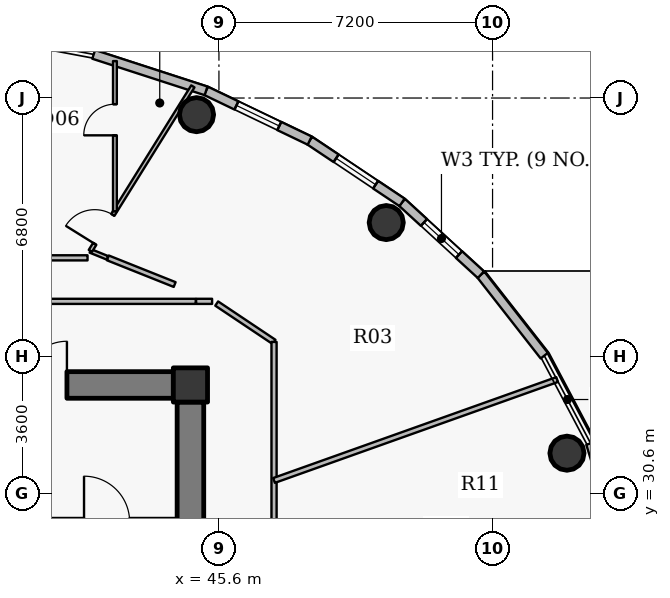
"""IFC4 building model, lengths in metres.
Left out: names, types, materials, properties, quantities, classifications, styles, units other than length and angle.
Written with IfcOpenShell. Run it as: python <this file> out.ifc"""

import sys

from ifc_helpers import new_model, si_unit, direction, frame, frame_2d, origin, origin_2d, place, context, subcontext, project, spatial, rectangle, hollow_circle, extrude, source, transform, mapped, element, fill, save


model = new_model("IFC4")
c1 = context("Model", 3, precision=1e-05, world=origin(), true_north=direction((0.0, 1.0)))
c2 = subcontext(c1, "Body", "Model", "MODEL_VIEW")
j1 = project(units=[si_unit("LENGTHUNIT", "METRE"), si_unit("PLANEANGLEUNIT", "RADIAN")], contexts=[c1])
p1 = place(None, origin())
s1 = spatial("IfcSite", under=j1, at=p1, CompositionType="ELEMENT")
p2 = place(p1, origin())
s2 = spatial("IfcBuilding", under=s1, at=p2, CompositionType="ELEMENT")
p3 = place(p2, frame((0.0, 0.0, 355.2)))
s3 = spatial("IfcBuildingStorey", under=s2, at=p3, CompositionType="ELEMENT", Elevation=355.2)
p4 = place(p3, frame((44.85, 33.45, 0.0), z_axis=(0.0, 0.0, 1.0), x_axis=(1.0, 0.0, 0.0)))
e1 = element("IfcColumn", 1, at=p4, inside=s3, PredefinedType="COLUMN", context=c2, shape_type="SweptSolid", body=[
    extrude(rectangle(XDim=0.9, YDim=0.9, at=origin_2d()), origin(), (0.0, 0.0, 1.0), 4.2),
])
p5 = place(p3, frame((27.6, 33.45, 0.0), z_axis=(0.0, 0.0, 1.0), x_axis=(1.0, 0.0, 0.0)))
e2 = element("IfcWall", 2, at=p5, inside=s3, PredefinedType="SHEAR", context=c2, shape_type="SweptSolid", body=[
    extrude(rectangle(XDim=16.8, YDim=0.7, at=frame_2d((8.4, 0.0))), origin(), (0.0, 0.0, 1.0), 3.5),
])
p6 = place(p5, frame((12.85, 0.0, 0.0)))
e3 = element("IfcOpeningElement", 3, at=p6, cuts=e2, PredefinedType="OPENING", context=c2, shape_type="SweptSolid", body=[
    extrude(rectangle(XDim=1.15, YDim=2.15, at=origin_2d()), frame((0.575, 0.36, 1.075), z_axis=(0.0, -1.0, 0.0), x_axis=(1.0, 0.0, 0.0)), (0.0, 0.0, 1.0), 0.72),
])
p7 = place(p3, frame((44.85, 33.0, 0.0), z_axis=(0.0, 0.0, 1.0), x_axis=(0.0, -1.0, 0.0)))
e4 = element("IfcWall", 4, at=p7, inside=s3, PredefinedType="SHEAR", context=c2, shape_type="SweptSolid", body=[
    extrude(rectangle(XDim=12.0, YDim=0.7, at=frame_2d((6.0, 0.0))), origin(), (0.0, 0.0, 1.0), 3.5),
])
for number, where, z_axis, x_axis in (
    (5, (54.758, 31.655, 0.0), (0.0, 0.0, 1.0), (1.0, 0.0, 0.0)),
    (6, (50.002, 37.723, 0.0), (0.0, 0.0, 1.0), (1.0, 0.0, 0.0)),
    (7, (45.01, 40.562, 0.0), (0.0, 0.0, 1.0), (1.0, 0.0, 0.0)),
):
    element("IfcColumn", number, at=place(p3, frame(where, z_axis=z_axis, x_axis=x_axis)), inside=s3, PredefinedType="COLUMN", context=c2, shape_type="SweptSolid", body=[
        extrude(hollow_circle(Radius=0.45, WallThickness=0.028, at=origin_2d()), origin(), (0.0, 0.0, 1.0), 4.2),
    ])
p8 = place(p3, frame((55.381, 31.913, 0.0), z_axis=(0.0, 0.0, 1.0), x_axis=(0.293105547213, -0.956080089842, 0.0)))
e8 = element("IfcWall", 8, at=p8, inside=s3, PredefinedType="SOLIDWALL", context=c2, shape_type="SweptSolid", body=[
    extrude(rectangle(XDim=2.538, YDim=0.24, at=frame_2d((1.269, 0.0))), origin(), (0.0, 0.0, 1.0), 3.95),
])
p9 = place(p3, frame((52.493, 36.352, 0.0), z_axis=(0.0, 0.0, 1.0), x_axis=(0.616286367698, -0.78752213492, 0.0)))
e9 = element("IfcWall", 9, at=p9, inside=s3, PredefinedType="SOLIDWALL", context=c2, shape_type="SweptSolid", body=[
    extrude(rectangle(XDim=2.706, YDim=0.24, at=frame_2d((1.353, 0.0))), origin(), (0.0, 0.0, 1.0), 3.95),
])
p10 = place(p3, frame((50.419, 38.254, 0.0), z_axis=(0.0, 0.0, 1.0), x_axis=(0.737020907932, -0.675869944051, 0.0)))
e10 = element("IfcWall", 10, at=p10, inside=s3, PredefinedType="SOLIDWALL", context=c2, shape_type="SweptSolid", body=[
    extrude(rectangle(XDim=2.815, YDim=0.24, at=frame_2d((1.407, 0.0))), origin(), (0.0, 0.0, 1.0), 3.95),
])
p11 = place(p10, frame((0.782, 0.0, 0.9)))
e11 = element("IfcOpeningElement", 11, at=p11, cuts=e10, PredefinedType="OPENING", context=c2, shape_type="SweptSolid", body=[
    extrude(rectangle(XDim=1.25, YDim=1.65, at=origin_2d()), frame((0.625, 0.13, 0.825), z_axis=(0.0, -1.0, 0.0), x_axis=(1.0, 0.0, 0.0)), (0.0, 0.0, 1.0), 0.26),
])
p12 = place(p3, frame((47.988, 39.88, 0.0), z_axis=(0.0, 0.0, 1.0), x_axis=(0.831201688654, -0.555970999944, 0.0)))
e12 = element("IfcWall", 12, at=p12, inside=s3, PredefinedType="SOLIDWALL", context=c2, shape_type="SweptSolid", body=[
    extrude(rectangle(XDim=2.925, YDim=0.24, at=frame_2d((1.462, 0.0))), origin(), (0.0, 0.0, 1.0), 3.95),
])
p13 = place(p12, frame((0.837, 0.0, 0.9)))
e13 = element("IfcOpeningElement", 13, at=p13, cuts=e12, PredefinedType="OPENING", context=c2, shape_type="SweptSolid", body=[
    extrude(rectangle(XDim=1.25, YDim=1.65, at=origin_2d()), frame((0.625, 0.13, 0.825), z_axis=(0.0, -1.0, 0.0), x_axis=(1.0, 0.0, 0.0)), (0.0, 0.0, 1.0), 0.26),
])
p14 = place(p3, frame((45.26, 41.189, 0.0), z_axis=(0.0, 0.0, 1.0), x_axis=(0.901557057889, -0.432660226241, 0.0)))
e14 = element("IfcWall", 14, at=p14, inside=s3, PredefinedType="SOLIDWALL", context=c2, shape_type="SweptSolid", body=[
    extrude(rectangle(XDim=3.025, YDim=0.24, at=frame_2d((1.513, 0.0))), origin(), (0.0, 0.0, 1.0), 3.95),
])
p15 = place(p14, frame((0.887, 0.0, 0.9)))
e15 = element("IfcOpeningElement", 15, at=p15, cuts=e14, PredefinedType="OPENING", context=c2, shape_type="SweptSolid", body=[
    extrude(rectangle(XDim=1.25, YDim=1.65, at=origin_2d()), frame((0.625, 0.13, 0.825), z_axis=(0.0, -1.0, 0.0), x_axis=(1.0, 0.0, 0.0)), (0.0, 0.0, 1.0), 0.26),
])
p16 = place(p3, frame((42.304, 42.148, 0.0), z_axis=(0.0, 0.0, 1.0), x_axis=(0.951212850731, -0.308535431682, 0.0)))
e16 = element("IfcWall", 16, at=p16, inside=s3, PredefinedType="SOLIDWALL", context=c2, shape_type="SweptSolid", body=[
    extrude(rectangle(XDim=3.108, YDim=0.24, at=frame_2d((1.554, 0.0))), origin(), (0.0, 0.0, 1.0), 3.95),
])
p17 = place(p3, frame((35.95, 29.85, 0.0), z_axis=(0.0, 0.0, 1.0), x_axis=(1.0, 0.0, 0.0)))
e17 = element("IfcWall", 17, at=p17, inside=s3, PredefinedType="PARTITIONING", context=c2, shape_type="SweptSolid", body=[
    extrude(rectangle(XDim=8.49, YDim=0.2, at=frame_2d((4.245, 0.0))), origin(), (0.0, 0.0, 1.0), 3.535),
])
p18 = place(p17, frame((6.1, 0.0, 0.0)))
e18 = element("IfcOpeningElement", 18, at=p18, cuts=e17, PredefinedType="OPENING", context=c2, shape_type="SweptSolid", body=[
    extrude(rectangle(XDim=1.2, YDim=2.15, at=origin_2d()), frame((0.6, 0.11, 1.075), z_axis=(0.0, -1.0, 0.0), x_axis=(1.0, 0.0, 0.0)), (0.0, 0.0, 1.0), 0.22),
])
p19 = place(p17, frame((0.37, 0.0, 0.0)))
e19 = element("IfcOpeningElement", 19, at=p19, cuts=e17, PredefinedType="OPENING", context=c2, shape_type="SweptSolid", body=[
    extrude(rectangle(XDim=1.15, YDim=2.15, at=origin_2d()), frame((0.575, 0.11, 1.075), z_axis=(0.0, -1.0, 0.0), x_axis=(1.0, 0.0, 0.0)), (0.0, 0.0, 1.0), 0.22),
])
p20 = place(p17, frame((2.425, 0.0, 0.0)))
e20 = element("IfcOpeningElement", 20, at=p20, cuts=e17, PredefinedType="OPENING", context=c2, shape_type="SweptSolid", body=[
    extrude(rectangle(XDim=1.05, YDim=2.15, at=origin_2d()), frame((0.525, 0.11, 1.075), z_axis=(0.0, -1.0, 0.0), x_axis=(1.0, 0.0, 0.0)), (0.0, 0.0, 1.0), 0.22),
])
p21 = place(p3, frame((42.216, 36.977, 0.0), z_axis=(0.0, 0.0, 1.0), x_axis=(0.926767657822, -0.375635073463, 0.0)))
e21 = element("IfcWall", 21, at=p21, inside=s3, PredefinedType="PARTITIONING", context=c2, shape_type="SweptSolid", body=[
    extrude(rectangle(XDim=0.486, YDim=0.1, at=frame_2d((0.243, 0.0))), origin(), (0.0, 0.0, 1.0), 3.485),
])
p22 = place(p3, frame((42.216, 36.977, 0.0), z_axis=(0.0, 0.0, 1.0), x_axis=(0.528823937776, 0.848731549334, 0.0)))
e22 = element("IfcWall", 22, at=p22, inside=s3, PredefinedType="PARTITIONING", context=c2, shape_type="SweptSolid", body=[
    extrude(rectangle(XDim=5.101, YDim=0.1, at=frame_2d((2.551, 0.0))), origin(), (0.0, 0.0, 1.0), 3.435),
])
p23 = place(p22, frame((0.218, 0.0, 0.0)))
e23 = element("IfcOpeningElement", 23, at=p23, cuts=e22, PredefinedType="OPENING", context=c2, shape_type="SweptSolid", body=[
    extrude(rectangle(XDim=0.9, YDim=2.1, at=origin_2d()), frame((0.45, 0.06, 1.05), z_axis=(0.0, -1.0, 0.0), x_axis=(1.0, 0.0, 0.0)), (0.0, 0.0, 1.0), 0.12),
])
p24 = place(p3, frame((42.863, 38.015, 0.0), z_axis=(0.0, 0.0, 1.0), x_axis=(0.0, 1.0, 0.0)))
e24 = element("IfcWall", 24, at=p24, inside=s3, PredefinedType="PARTITIONING", context=c2, shape_type="SweptSolid", body=[
    extrude(rectangle(XDim=3.957, YDim=0.1, at=frame_2d((1.979, 0.0))), origin(), (0.0, 0.0, 1.0), 3.435),
])
p25 = place(p24, frame((2.003, 0.0, 0.0)))
e25 = element("IfcOpeningElement", 25, at=p25, cuts=e24, PredefinedType="OPENING", context=c2, shape_type="SweptSolid", body=[
    extrude(rectangle(XDim=0.82, YDim=2.1, at=origin_2d()), frame((0.41, 0.06, 1.05), z_axis=(0.0, -1.0, 0.0), x_axis=(1.0, 0.0, 0.0)), (0.0, 0.0, 1.0), 0.12),
])
p26 = place(p3, frame((44.999, 35.65, 0.0), z_axis=(0.0, 0.0, 1.0), x_axis=(1.0, 0.0, 0.0)))
e26 = element("IfcWall", 26, at=p26, inside=s3, PredefinedType="PARTITIONING", context=c2, shape_type="SweptSolid", body=[
    extrude(rectangle(XDim=0.421, YDim=0.135, at=frame_2d((0.21, 0.0))), origin(), (0.0, 0.0, 1.0), 3.95),
])
p27 = place(p3, frame((45.541, 35.592, 0.0), z_axis=(0.0, 0.0, 1.0), x_axis=(0.831180227396, -0.556003084151, 0.0)))
e27 = element("IfcWall", 27, at=p27, inside=s3, PredefinedType="PARTITIONING", context=c2, shape_type="SweptSolid", body=[
    extrude(rectangle(XDim=1.815, YDim=0.135, at=frame_2d((0.908, 0.0))), origin(), (0.0, 0.0, 1.0), 3.485),
])
p28 = place(p3, frame((47.05, 19.417, 0.0), z_axis=(0.0, 0.0, 1.0), x_axis=(0.0, 1.0, 0.0)))
e28 = element("IfcWall", 28, at=p28, inside=s3, PredefinedType="PARTITIONING", context=c2, shape_type="SweptSolid", body=[
    extrude(rectangle(XDim=15.165, YDim=0.135, at=frame_2d((7.583, 0.0))), origin(), (0.0, 0.0, 1.0), 3.485),
])
p29 = place(p3, frame((47.05, 30.938, 0.0), z_axis=(0.0, 0.0, 1.0), x_axis=(0.94198404568, 0.335657649524, 0.0)))
e29 = element("IfcWall", 29, at=p29, inside=s3, PredefinedType="PARTITIONING", context=c2, shape_type="SweptSolid", body=[
    extrude(rectangle(XDim=7.908, YDim=0.135, at=frame_2d((3.954, 0.0))), origin(), (0.0, 0.0, 1.0), 3.435),
])
p30 = place(p3, frame((37.258, 35.65, 0.0), z_axis=(0.0, 0.0, 1.0), x_axis=(1.0, 0.0, 0.0)))
e30 = element("IfcWall", 30, at=p30, inside=s3, PredefinedType="PARTITIONING", context=c2, shape_type="SweptSolid", body=[
    extrude(rectangle(XDim=7.732, YDim=0.135, at=frame_2d((3.866, 0.0))), origin(), (0.0, 0.0, 1.0), 3.485),
])
p31 = place(p3, frame((45.2, 33.8, 0.0), z_axis=(0.0, 0.0, 1.0), x_axis=(-1.0, 0.0, 0.0)))
e31 = element("IfcWall", 31, at=p31, inside=s3, PredefinedType="PARTITIONING", context=c2, shape_type="SweptSolid", body=[
    extrude(rectangle(XDim=0.79, YDim=0.135, at=frame_2d((0.395, 0.0))), origin(), (0.0, 0.0, 1.0), 3.485),
])
p32 = place(p3, frame((45.2, 33.01, 0.0), z_axis=(0.0, 0.0, 1.0), x_axis=(0.0, 1.0, 0.0)))
e32 = element("IfcWall", 32, at=p32, inside=s3, PredefinedType="PARTITIONING", context=c2, shape_type="SweptSolid", body=[
    extrude(rectangle(XDim=0.482, YDim=0.135, at=frame_2d((0.241, 0.0))), origin(), (0.0, 0.0, 1.0), 3.95),
])
p33 = place(p3, frame((42.142, 36.795, 0.0), z_axis=(0.0, 0.0, 1.0), x_axis=(-1.0, 0.0, 0.0)))
e33 = element("IfcWall", 33, at=p33, inside=s3, PredefinedType="PARTITIONING", context=c2, shape_type="SweptSolid", body=[
    extrude(rectangle(XDim=4.865, YDim=0.135, at=frame_2d((2.432, 0.0))), origin(), (0.0, 0.0, 1.0), 3.95),
])
p34 = place(p3, frame((44.435, 36.092, 0.0), z_axis=(0.0, 0.0, 1.0), x_axis=(-0.928778774969, 0.370634573627, 0.0)))
e34 = element("IfcWall", 34, at=p34, inside=s3, PredefinedType="PARTITIONING", context=c2, shape_type="SweptSolid", body=[
    extrude(rectangle(XDim=1.893, YDim=0.135, at=frame_2d((0.947, 0.0))), origin(), (0.0, 0.0, 1.0), 3.485),
])
m1 = source(origin(), c2, "Body", "SweptSolid", [
    extrude(rectangle(XDim=1.25, YDim=1.65, at=origin_2d()), frame((0.625, 0.03, 0.825), z_axis=(0.0, -1.0, 0.0), x_axis=(1.0, 0.0, 0.0)), (0.0, 0.0, 1.0), 0.06),
])
p35 = place(p11, origin())
e35 = element("IfcWindow", 35, at=p35, inside=s3, PartitioningType="SINGLE_PANEL", PredefinedType="WINDOW", context=c2, shape_type="MappedRepresentation", body=[
    mapped(m1, transform((0.0, 0.0, 0.0), x_axis=(1.0, 0.0, 0.0), y_axis=(0.0, 1.0, 0.0), z_axis=(0.0, 0.0, 1.0), scale=1.0)),
])
fill(e11, e35)
p36 = place(p13, origin())
e36 = element("IfcWindow", 36, at=p36, inside=s3, PartitioningType="SINGLE_PANEL", PredefinedType="WINDOW", context=c2, shape_type="MappedRepresentation", body=[
    mapped(m1, transform((0.0, 0.0, 0.0), x_axis=(1.0, 0.0, 0.0), y_axis=(0.0, 1.0, 0.0), z_axis=(0.0, 0.0, 1.0), scale=1.0)),
])
fill(e13, e36)
p37 = place(p15, origin())
e37 = element("IfcWindow", 37, at=p37, inside=s3, PartitioningType="SINGLE_PANEL", PredefinedType="WINDOW", context=c2, shape_type="MappedRepresentation", body=[
    mapped(m1, transform((0.0, 0.0, 0.0), x_axis=(1.0, 0.0, 0.0), y_axis=(0.0, 1.0, 0.0), z_axis=(0.0, 0.0, 1.0), scale=1.0)),
])
fill(e15, e37)
m2 = source(origin(), c2, "Body", "SweptSolid", [
    extrude(rectangle(XDim=1.15, YDim=2.15, at=origin_2d()), frame((0.575, 0.025, 1.075), z_axis=(0.0, -1.0, 0.0), x_axis=(1.0, 0.0, 0.0)), (0.0, 0.0, 1.0), 0.05),
])
p38 = place(p6, origin())
e38 = element("IfcDoor", 38, at=p38, inside=s3, OperationType="SINGLE_SWING_RIGHT", PredefinedType="DOOR", context=c2, shape_type="MappedRepresentation", body=[
    mapped(m2, transform((0.0, 0.0, 0.0), x_axis=(1.0, 0.0, 0.0), y_axis=(0.0, 1.0, 0.0), z_axis=(0.0, 0.0, 1.0), scale=1.0)),
])
fill(e3, e38)
m3 = source(origin(), c2, "Body", "SweptSolid", [
    extrude(rectangle(XDim=0.9, YDim=2.1, at=origin_2d()), frame((0.45, 0.025, 1.05), z_axis=(0.0, -1.0, 0.0), x_axis=(1.0, 0.0, 0.0)), (0.0, 0.0, 1.0), 0.05),
])
p39 = place(p23, origin())
e39 = element("IfcDoor", 39, at=p39, inside=s3, OperationType="SINGLE_SWING_LEFT", PredefinedType="DOOR", context=c2, shape_type="MappedRepresentation", body=[
    mapped(m3, transform((0.0, 0.0, 0.0), x_axis=(1.0, 0.0, 0.0), y_axis=(0.0, 1.0, 0.0), z_axis=(0.0, 0.0, 1.0), scale=1.0)),
])
fill(e23, e39)
m4 = source(origin(), c2, "Body", "SweptSolid", [
    extrude(rectangle(XDim=0.82, YDim=2.1, at=origin_2d()), frame((0.41, 0.025, 1.05), z_axis=(0.0, -1.0, 0.0), x_axis=(1.0, 0.0, 0.0)), (0.0, 0.0, 1.0), 0.05),
])
p40 = place(p25, origin())
e40 = element("IfcDoor", 40, at=p40, inside=s3, OperationType="SINGLE_SWING_LEFT", PredefinedType="DOOR", context=c2, shape_type="MappedRepresentation", body=[
    mapped(m4, transform((0.0, 0.0, 0.0), x_axis=(1.0, 0.0, 0.0), y_axis=(0.0, 1.0, 0.0), z_axis=(0.0, 0.0, 1.0), scale=1.0)),
])
fill(e25, e40)
save(model, sys.argv[1])
